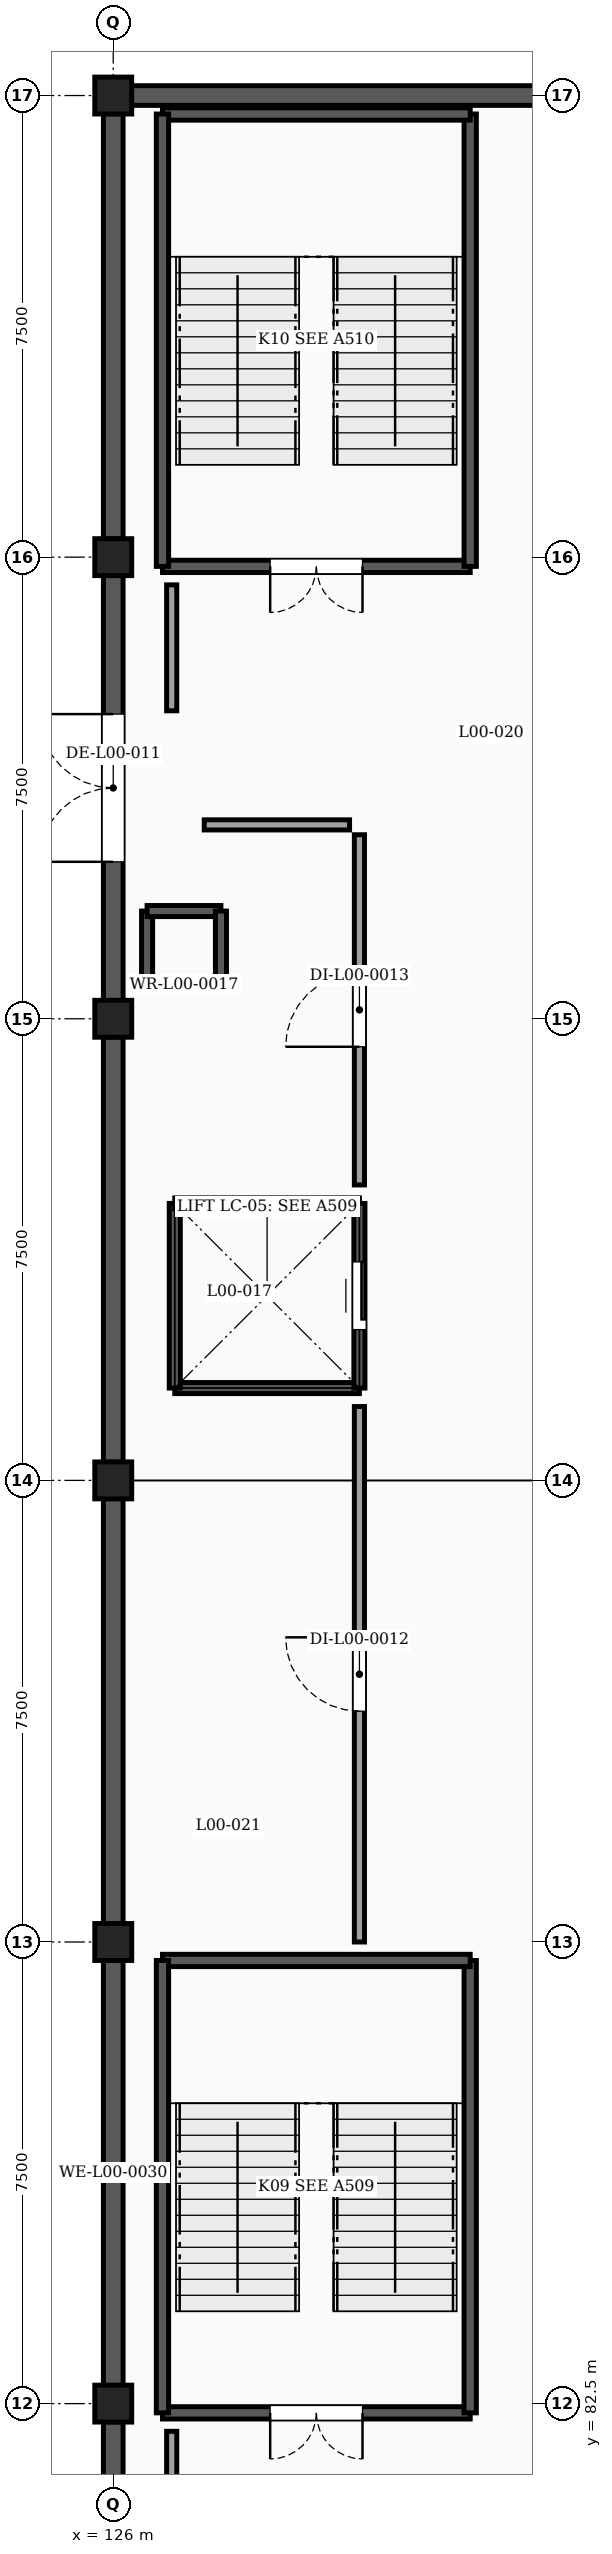
"""IFC4 building model, lengths in metres.
Left out: names, types, materials, properties, quantities, classifications, styles, units other than length and angle.
Written with IfcOpenShell. Run it as: python <this file> out.ifc"""

import sys

from ifc_helpers import new_model, si_unit, direction, frame, frame_2d, origin, origin_2d, place, context, subcontext, project, spatial, rectangle, extrude, element, fill, save


model = new_model("IFC4")
c1 = context("Model", 3, precision=1e-05, world=origin(), true_north=direction((0.0, 1.0)))
c2 = subcontext(c1, "Body", "Model", "MODEL_VIEW")
j1 = project(units=[si_unit("LENGTHUNIT", "METRE"), si_unit("PLANEANGLEUNIT", "RADIAN")], contexts=[c1])
p1 = place(None, origin())
s1 = spatial("IfcSite", under=j1, at=p1, CompositionType="ELEMENT")
p2 = place(p1, origin())
s2 = spatial("IfcBuilding", under=s1, at=p2, CompositionType="ELEMENT")
p3 = place(p2, origin())
s3 = spatial("IfcBuildingStorey", under=s2, at=p3, CompositionType="ELEMENT", Elevation=0.0)
for number, where, z_axis, x_axis in (
    (1, (126.0, 82.5, -0.25), (0.0, 0.0, 1.0), (1.0, 0.0, 0.0)),
    (2, (126.0, 90.0, -0.25), (0.0, 0.0, 1.0), (1.0, 0.0, 0.0)),
    (3, (126.0, 97.5, -0.25), (0.0, 0.0, 1.0), (1.0, 0.0, 0.0)),
    (4, (126.0, 105.0, -0.25), (0.0, 0.0, 1.0), (1.0, 0.0, 0.0)),
    (5, (126.0, 112.5, -0.25), (0.0, 0.0, 1.0), (1.0, 0.0, 0.0)),
    (6, (126.0, 120.0, -0.25), (0.0, 0.0, 1.0), (1.0, 0.0, 0.0)),
):
    element("IfcColumn", number, at=place(p3, frame(where, z_axis=z_axis, x_axis=x_axis)), inside=s3, PredefinedType="COLUMN", context=c2, shape_type="SweptSolid", body=[
        extrude(rectangle(XDim=0.6, YDim=0.6, at=origin_2d()), origin(), (0.0, 0.0, 1.0), 4.75),
    ])
p4 = place(p3, frame((126.296, 120.0, 0.0), z_axis=(0.0, 0.0, 1.0), x_axis=(1.0, 0.0, 0.0)))
e7 = element("IfcWall", 7, at=p4, inside=s3, PredefinedType="SOLIDWALL", context=c2, shape_type="SweptSolid", body=[
    extrude(rectangle(XDim=8.483, YDim=0.32, at=frame_2d((4.242, 0.0))), origin(), (0.0, 0.0, 1.0), 3.492),
])
p5 = place(p3, frame((126.0, 75.296, 0.0), z_axis=(0.0, 0.0, 1.0), x_axis=(0.0, 1.0, 0.0)))
e8 = element("IfcWall", 8, at=p5, inside=s3, PredefinedType="SOLIDWALL", context=c2, shape_type="SweptSolid", body=[
    extrude(rectangle(XDim=6.908, YDim=0.32, at=frame_2d((3.454, 0.0))), origin(), (0.0, 0.0, 1.0), 3.492),
])
p6 = place(p5, frame((2.254, 0.0, 0.0)))
e9 = element("IfcOpeningElement", 9, at=p6, cuts=e8, PredefinedType="OPENING", context=c2, shape_type="SweptSolid", body=[
    extrude(rectangle(XDim=2.4, YDim=2.2, at=frame_2d((1.2, 1.1))), frame((0.0, 0.17, 0.0), z_axis=(0.0, -1.0, 0.0), x_axis=(1.0, 0.0, 0.0)), (0.0, 0.0, 1.0), 0.34),
])
for number, where, z_axis, x_axis in (
    (10, (126.0, 82.796, 0.0), (0.0, 0.0, 1.0), (0.0, 1.0, 0.0)),
    (11, (126.0, 90.296, 0.0), (0.0, 0.0, 1.0), (0.0, 1.0, 0.0)),
    (12, (126.0, 97.796, 0.0), (0.0, 0.0, 1.0), (0.0, 1.0, 0.0)),
):
    element("IfcWall", number, at=place(p3, frame(where, z_axis=z_axis, x_axis=x_axis)), inside=s3, PredefinedType="SOLIDWALL", context=c2, shape_type="SweptSolid", body=[
        extrude(rectangle(XDim=6.908, YDim=0.32, at=frame_2d((3.454, 0.0))), origin(), (0.0, 0.0, 1.0), 3.492),
    ])
p7 = place(p3, frame((126.0, 105.296, 0.0), z_axis=(0.0, 0.0, 1.0), x_axis=(0.0, 1.0, 0.0)))
e13 = element("IfcWall", 13, at=p7, inside=s3, PredefinedType="SOLIDWALL", context=c2, shape_type="SweptSolid", body=[
    extrude(rectangle(XDim=6.908, YDim=0.32, at=frame_2d((3.454, 0.0))), origin(), (0.0, 0.0, 1.0), 3.492),
])
p8 = place(p7, frame((2.254, 0.0, 0.0)))
e14 = element("IfcOpeningElement", 14, at=p8, cuts=e13, PredefinedType="OPENING", context=c2, shape_type="SweptSolid", body=[
    extrude(rectangle(XDim=2.4, YDim=2.2, at=frame_2d((1.2, 1.1))), frame((0.0, 0.17, 0.0), z_axis=(0.0, -1.0, 0.0), x_axis=(1.0, 0.0, 0.0)), (0.0, 0.0, 1.0), 0.34),
])
p9 = place(p3, frame((126.0, 112.796, 0.0), z_axis=(0.0, 0.0, 1.0), x_axis=(0.0, 1.0, 0.0)))
e15 = element("IfcWall", 15, at=p9, inside=s3, PredefinedType="SOLIDWALL", context=c2, shape_type="SweptSolid", body=[
    extrude(rectangle(XDim=6.908, YDim=0.32, at=frame_2d((3.454, 0.0))), origin(), (0.0, 0.0, 1.0), 3.492),
])
for number, where, z_axis, x_axis in (
    (16, (127.75, 105.55, 0.0), (0.0, 0.0, 1.0), (-1.0, 0.0, 0.0)),
    (17, (126.55, 105.55, 0.0), (0.0, 0.0, 1.0), (0.0, 1.0, 0.0)),
    (18, (126.55, 106.75, 0.0), (0.0, 0.0, 1.0), (1.0, 0.0, 0.0)),
    (19, (127.75, 106.75, 0.0), (0.0, 0.0, 1.0), (0.0, -1.0, 0.0)),
):
    element("IfcWall", number, at=place(p3, frame(where, z_axis=z_axis, x_axis=x_axis)), inside=s3, PredefinedType="SHEAR", context=c2, shape_type="SweptSolid", body=[
        extrude(rectangle(XDim=1.2, YDim=0.18, at=frame_2d((0.6, 0.0))), origin(), (0.0, 0.0, 1.0), 4.1),
    ])
p10 = place(p3, frame((131.8, 82.35, 0.0), z_axis=(0.0, 0.0, 1.0), x_axis=(-1.0, 0.0, 0.0)))
e20 = element("IfcWall", 20, at=p10, inside=s3, PredefinedType="SHEAR", context=c2, shape_type="SweptSolid", body=[
    extrude(rectangle(XDim=5.0, YDim=0.2, at=frame_2d((2.5, 0.0))), origin(), (0.0, 0.0, 1.0), 4.1),
])
p11 = place(p10, frame((1.75, 0.0, 0.0)))
e21 = element("IfcOpeningElement", 21, at=p11, cuts=e20, PredefinedType="OPENING", context=c2, shape_type="SweptSolid", body=[
    extrude(rectangle(XDim=1.5, YDim=2.15, at=frame_2d((0.75, 1.075))), frame((0.0, 0.11, 0.0), z_axis=(0.0, -1.0, 0.0), x_axis=(1.0, 0.0, 0.0)), (0.0, 0.0, 1.0), 0.22),
])
p12 = place(p3, frame((131.8, 82.35, 0.0), z_axis=(0.0, 0.0, 1.0), x_axis=(0.0, 1.0, 0.0)))
e22 = element("IfcWall", 22, at=p12, inside=s3, PredefinedType="SHEAR", context=c2, shape_type="SweptSolid", body=[
    extrude(rectangle(XDim=7.35, YDim=0.2, at=frame_2d((3.675, 0.0))), origin(), (0.0, 0.0, 1.0), 4.1),
])
p13 = place(p3, frame((131.8, 89.7, 0.0), z_axis=(0.0, 0.0, 1.0), x_axis=(-1.0, 0.0, 0.0)))
e23 = element("IfcWall", 23, at=p13, inside=s3, PredefinedType="SHEAR", context=c2, shape_type="SweptSolid", body=[
    extrude(rectangle(XDim=5.0, YDim=0.2, at=frame_2d((2.5, 0.0))), origin(), (0.0, 0.0, 1.0), 4.1),
])
p14 = place(p3, frame((126.8, 89.7, 0.0), z_axis=(0.0, 0.0, 1.0), x_axis=(0.0, -1.0, 0.0)))
e24 = element("IfcWall", 24, at=p14, inside=s3, PredefinedType="SHEAR", context=c2, shape_type="SweptSolid", body=[
    extrude(rectangle(XDim=7.35, YDim=0.2, at=frame_2d((3.675, 0.0))), origin(), (0.0, 0.0, 1.0), 4.1),
])
p15 = place(p3, frame((131.8, 112.35, 0.0), z_axis=(0.0, 0.0, 1.0), x_axis=(-1.0, 0.0, 0.0)))
e25 = element("IfcWall", 25, at=p15, inside=s3, PredefinedType="SHEAR", context=c2, shape_type="SweptSolid", body=[
    extrude(rectangle(XDim=5.0, YDim=0.2, at=frame_2d((2.5, 0.0))), origin(), (0.0, 0.0, 1.0), 4.1),
])
p16 = place(p15, frame((1.75, 0.0, 0.0)))
e26 = element("IfcOpeningElement", 26, at=p16, cuts=e25, PredefinedType="OPENING", context=c2, shape_type="SweptSolid", body=[
    extrude(rectangle(XDim=1.5, YDim=2.15, at=frame_2d((0.75, 1.075))), frame((0.0, 0.11, 0.0), z_axis=(0.0, -1.0, 0.0), x_axis=(1.0, 0.0, 0.0)), (0.0, 0.0, 1.0), 0.22),
])
p17 = place(p3, frame((131.8, 112.35, 0.0), z_axis=(0.0, 0.0, 1.0), x_axis=(0.0, 1.0, 0.0)))
e27 = element("IfcWall", 27, at=p17, inside=s3, PredefinedType="SHEAR", context=c2, shape_type="SweptSolid", body=[
    extrude(rectangle(XDim=7.35, YDim=0.2, at=frame_2d((3.675, 0.0))), origin(), (0.0, 0.0, 1.0), 4.1),
])
p18 = place(p3, frame((131.8, 119.7, 0.0), z_axis=(0.0, 0.0, 1.0), x_axis=(-1.0, 0.0, 0.0)))
e28 = element("IfcWall", 28, at=p18, inside=s3, PredefinedType="SHEAR", context=c2, shape_type="SweptSolid", body=[
    extrude(rectangle(XDim=5.0, YDim=0.2, at=frame_2d((2.5, 0.0))), origin(), (0.0, 0.0, 1.0), 4.1),
])
p19 = place(p3, frame((126.8, 119.7, 0.0), z_axis=(0.0, 0.0, 1.0), x_axis=(0.0, -1.0, 0.0)))
e29 = element("IfcWall", 29, at=p19, inside=s3, PredefinedType="SHEAR", context=c2, shape_type="SweptSolid", body=[
    extrude(rectangle(XDim=7.35, YDim=0.2, at=frame_2d((3.675, 0.0))), origin(), (0.0, 0.0, 1.0), 4.1),
])
for number, where, z_axis, x_axis in (
    (30, (130.0, 99.0, -0.2), (0.0, 0.0, 1.0), (-1.0, 0.0, 0.0)),
    (31, (127.0, 99.0, -0.2), (0.0, 0.0, 1.0), (0.0, 1.0, 0.0)),
    (32, (127.0, 102.0, -0.2), (0.0, 0.0, 1.0), (1.0, 0.0, 0.0)),
):
    element("IfcWall", number, at=place(p3, frame(where, z_axis=z_axis, x_axis=x_axis)), inside=s3, PredefinedType="SHEAR", context=c2, shape_type="SweptSolid", body=[
        extrude(rectangle(XDim=3.0, YDim=0.18, at=frame_2d((1.5, 0.0))), origin(), (0.0, 0.0, 1.0), 4.3),
    ])
p20 = place(p3, frame((130.0, 102.0, -0.2), z_axis=(0.0, 0.0, 1.0), x_axis=(0.0, -1.0, 0.0)))
e33 = element("IfcWall", 33, at=p20, inside=s3, PredefinedType="SHEAR", context=c2, shape_type="SweptSolid", body=[
    extrude(rectangle(XDim=3.0, YDim=0.18, at=frame_2d((1.5, 0.0))), origin(), (0.0, 0.0, 1.0), 4.3),
])
p21 = place(p20, frame((0.95, 0.0, 0.2)))
e34 = element("IfcOpeningElement", 34, at=p21, cuts=e33, PredefinedType="OPENING", context=c2, shape_type="SweptSolid", body=[
    extrude(rectangle(XDim=1.1, YDim=2.15, at=frame_2d((0.55, 1.075))), frame((0.0, 0.1, 0.0), z_axis=(0.0, -1.0, 0.0), x_axis=(1.0, 0.0, 0.0)), (0.0, 0.0, 1.0), 0.2),
])
p22 = place(p3, frame((126.95, 80.004, 0.0), z_axis=(0.0, 0.0, 1.0), x_axis=(0.0, 1.0, 0.0)))
e35 = element("IfcWall", 35, at=p22, inside=s3, PredefinedType="PARTITIONING", context=c2, shape_type="SweptSolid", body=[
    extrude(rectangle(XDim=2.046, YDim=0.165, at=frame_2d((1.023, 0.0))), origin(), (0.0, 0.0, 1.0), 4.1),
])
p23 = place(p3, frame((130.0, 90.0, 0.0), z_axis=(0.0, 0.0, 1.0), x_axis=(0.0, 1.0, 0.0)))
e36 = element("IfcWall", 36, at=p23, inside=s3, PredefinedType="PARTITIONING", context=c2, shape_type="SweptSolid", body=[
    extrude(rectangle(XDim=8.7, YDim=0.165, at=frame_2d((4.35, 0.0))), origin(), (0.0, 0.0, 1.0), 4.1),
])
p24 = place(p23, frame((3.75, 0.0, 0.0)))
e37 = element("IfcOpeningElement", 37, at=p24, cuts=e36, PredefinedType="OPENING", context=c2, shape_type="SweptSolid", body=[
    extrude(rectangle(XDim=1.2, YDim=2.15, at=frame_2d((0.6, 1.075))), frame((0.0, 0.093, 0.0), z_axis=(0.0, -1.0, 0.0), x_axis=(1.0, 0.0, 0.0)), (0.0, 0.0, 1.0), 0.185),
])
p25 = place(p3, frame((129.84, 108.15, 0.0), z_axis=(0.0, 0.0, 1.0), x_axis=(-1.0, 0.0, 0.0)))
e38 = element("IfcWall", 38, at=p25, inside=s3, PredefinedType="PARTITIONING", context=c2, shape_type="SweptSolid", body=[
    extrude(rectangle(XDim=2.362, YDim=0.165, at=frame_2d((1.181, 0.0))), origin(), (0.0, 0.0, 1.0), 4.1),
])
p26 = place(p3, frame((126.95, 110.004, 0.0), z_axis=(0.0, 0.0, 1.0), x_axis=(0.0, 1.0, 0.0)))
e39 = element("IfcWall", 39, at=p26, inside=s3, PredefinedType="PARTITIONING", context=c2, shape_type="SweptSolid", body=[
    extrude(rectangle(XDim=2.046, YDim=0.165, at=frame_2d((1.023, 0.0))), origin(), (0.0, 0.0, 1.0), 4.1),
])
p27 = place(p3, frame((130.0, 102.3, 0.0), z_axis=(0.0, 0.0, 1.0), x_axis=(0.0, 1.0, 0.0)))
e40 = element("IfcWall", 40, at=p27, inside=s3, PredefinedType="PARTITIONING", context=c2, shape_type="SweptSolid", body=[
    extrude(rectangle(XDim=5.69, YDim=0.165, at=frame_2d((2.845, 0.0))), origin(), (0.0, 0.0, 1.0), 4.1),
])
p28 = place(p27, frame((2.245, 0.0, 0.0)))
e41 = element("IfcOpeningElement", 41, at=p28, cuts=e40, PredefinedType="OPENING", context=c2, shape_type="SweptSolid", body=[
    extrude(rectangle(XDim=1.2, YDim=2.15, at=frame_2d((0.6, 1.075))), frame((0.0, 0.093, 0.0), z_axis=(0.0, -1.0, 0.0), x_axis=(1.0, 0.0, 0.0)), (0.0, 0.0, 1.0), 0.185),
])
p29 = place(p8, origin())
e42 = element("IfcDoor", 42, at=p29, inside=s3, OperationType="DOUBLE_DOOR_SINGLE_SWING", PredefinedType="DOOR", context=c2, shape_type="SweptSolid", body=[
    extrude(rectangle(XDim=2.4, YDim=2.2, at=frame_2d((1.2, 1.1))), frame((0.0, 0.025, 0.0), z_axis=(0.0, -1.0, 0.0), x_axis=(1.0, 0.0, 0.0)), (0.0, 0.0, 1.0), 0.05),
])
fill(e14, e42)
p30 = place(p11, origin())
e43 = element("IfcDoor", 43, at=p30, inside=s3, OperationType="DOUBLE_DOOR_SINGLE_SWING", PredefinedType="DOOR", context=c2, shape_type="SweptSolid", body=[
    extrude(rectangle(XDim=1.5, YDim=2.15, at=frame_2d((0.75, 1.075))), frame((0.0, 0.025, 0.0), z_axis=(0.0, -1.0, 0.0), x_axis=(1.0, 0.0, 0.0)), (0.0, 0.0, 1.0), 0.05),
])
fill(e21, e43)
p31 = place(p16, origin())
e44 = element("IfcDoor", 44, at=p31, inside=s3, OperationType="DOUBLE_DOOR_SINGLE_SWING", PredefinedType="DOOR", context=c2, shape_type="SweptSolid", body=[
    extrude(rectangle(XDim=1.5, YDim=2.15, at=frame_2d((0.75, 1.075))), frame((0.0, 0.025, 0.0), z_axis=(0.0, -1.0, 0.0), x_axis=(1.0, 0.0, 0.0)), (0.0, 0.0, 1.0), 0.05),
])
fill(e26, e44)
p32 = place(p21, origin())
e45 = element("IfcDoor", 45, at=p32, inside=s3, OperationType="SLIDING_TO_LEFT", PredefinedType="DOOR", context=c2, shape_type="SweptSolid", body=[
    extrude(rectangle(XDim=1.1, YDim=2.15, at=frame_2d((0.55, 1.075))), frame((0.0, 0.025, 0.0), z_axis=(0.0, -1.0, 0.0), x_axis=(1.0, 0.0, 0.0)), (0.0, 0.0, 1.0), 0.05),
])
fill(e34, e45)
p33 = place(p24, origin())
e46 = element("IfcDoor", 46, at=p33, inside=s3, OperationType="SINGLE_SWING_RIGHT", PredefinedType="DOOR", context=c2, shape_type="SweptSolid", body=[
    extrude(rectangle(XDim=1.2, YDim=2.15, at=frame_2d((0.6, 1.075))), frame((0.0, 0.025, 0.0), z_axis=(0.0, -1.0, 0.0), x_axis=(1.0, 0.0, 0.0)), (0.0, 0.0, 1.0), 0.05),
])
fill(e37, e46)
p34 = place(p28, origin())
e47 = element("IfcDoor", 47, at=p34, inside=s3, OperationType="SINGLE_SWING_LEFT", PredefinedType="DOOR", context=c2, shape_type="SweptSolid", body=[
    extrude(rectangle(XDim=1.2, YDim=2.15, at=frame_2d((0.6, 1.075))), frame((0.0, 0.025, 0.0), z_axis=(0.0, -1.0, 0.0), x_axis=(1.0, 0.0, 0.0)), (0.0, 0.0, 1.0), 0.05),
])
fill(e41, e47)
save(model, sys.argv[1])
